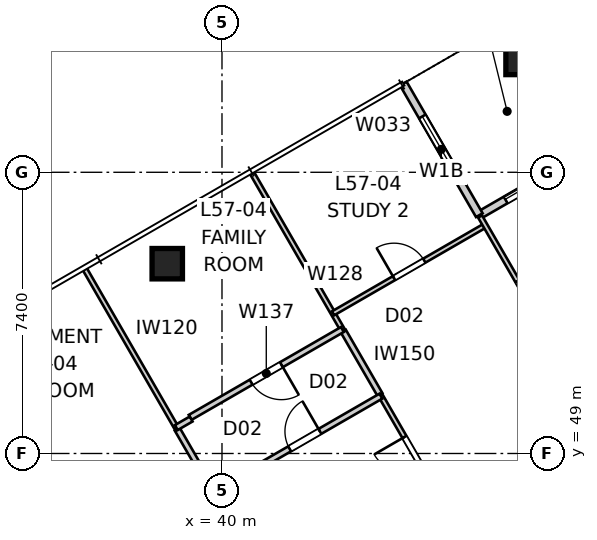
"""IFC4 building model, lengths in metres.
Left out: names, types, materials, properties, quantities, classifications, styles, units other than length and angle.
Written with IfcOpenShell. Run it as: python <this file> out.ifc"""

import sys

from ifc_helpers import new_model, si_unit, direction, frame, frame_2d, origin, origin_2d, place, context, subcontext, project, spatial, rectangle, extrude, element, fill, save


model = new_model("IFC4")
c1 = context("Model", 3, precision=1e-05, world=origin(), true_north=direction((0.0, 1.0)))
c2 = subcontext(c1, "Body", "Model", "MODEL_VIEW")
j1 = project(units=[si_unit("LENGTHUNIT", "METRE"), si_unit("PLANEANGLEUNIT", "RADIAN")], contexts=[c1])
p1 = place(None, origin())
s1 = spatial("IfcSite", under=j1, at=p1, CompositionType="ELEMENT")
p2 = place(p1, origin())
s2 = spatial("IfcBuilding", under=s1, at=p2, CompositionType="ELEMENT")
p3 = place(p2, frame((0.0, 0.0, 208.2)))
s3 = spatial("IfcBuildingStorey", under=s2, at=p3, CompositionType="ELEMENT", Elevation=208.2)
for number, where, z_axis, x_axis in (
    (1, (47.87, 59.37, -0.15), (0.0, 0.0, 1.0), (1.0, 0.0, 0.0)),
    (2, (38.56, 53.995, -0.15), (0.0, 0.0, 1.0), (1.0, 0.0, 0.0)),
):
    element("IfcColumn", number, at=place(p3, frame(where, z_axis=z_axis, x_axis=x_axis)), inside=s3, PredefinedType="COLUMN", context=c2, shape_type="SweptSolid", body=[
        extrude(rectangle(XDim=0.8, YDim=0.8, at=origin_2d()), origin(), (0.0, 0.0, 1.0), 3.55),
    ])
p4 = place(p3, frame((50.236, 57.271, 0.0), z_axis=(0.0, 0.0, 1.0), x_axis=(-0.866026010844, -0.49999894854, 0.0)))
e3 = element("IfcWall", 3, at=p4, inside=s3, PredefinedType="SOLIDWALL", context=c2, shape_type="SweptSolid", body=[
    extrude(rectangle(XDim=4.0, YDim=0.2, at=frame_2d((2.0, 0.0))), origin(), (0.0, 0.0, 1.0), 3.25),
])
p5 = place(p4, frame((0.8, 0.0, 0.0)))
e4 = element("IfcOpeningElement", 4, at=p5, cuts=e3, PredefinedType="OPENING", context=c2, shape_type="SweptSolid", body=[
    extrude(rectangle(XDim=2.4, YDim=2.1, at=frame_2d((1.2, 1.05))), frame((0.0, 0.11, 0.0), z_axis=(0.0, -1.0, 0.0), x_axis=(1.0, 0.0, 0.0)), (0.0, 0.0, 1.0), 0.22),
])
p6 = place(p3, frame((46.771, 55.271, 0.0), z_axis=(0.0, 0.0, 1.0), x_axis=(-0.49999894854, 0.866026010844, 0.0)))
e5 = element("IfcWall", 5, at=p6, inside=s3, PredefinedType="SOLIDWALL", context=c2, shape_type="SweptSolid", body=[
    extrude(rectangle(XDim=4.0, YDim=0.2, at=frame_2d((2.0, 0.0))), origin(), (0.0, 0.0, 1.0), 3.25),
])
p7 = place(p6, frame((1.0, 0.0, 0.45)))
e6 = element("IfcOpeningElement", 6, at=p7, cuts=e5, PredefinedType="OPENING", context=c2, shape_type="SweptSolid", body=[
    extrude(rectangle(XDim=2.0, YDim=1.8, at=frame_2d((1.0, 0.9))), frame((0.0, 0.11, 0.0), z_axis=(0.0, -1.0, 0.0), x_axis=(1.0, 0.0, 0.0)), (0.0, 0.0, 1.0), 0.22),
])
p8 = place(p3, frame((43.193, 52.219, 0.0), z_axis=(0.0, 0.0, 1.0), x_axis=(-0.50000634465, 0.866021740668, 0.0)))
e7 = element("IfcWall", 7, at=p8, inside=s3, PredefinedType="PARTITIONING", context=c2, shape_type="SweptSolid", body=[
    extrude(rectangle(XDim=4.814, YDim=0.12, at=frame_2d((2.407, 0.0))), origin(), (0.0, 0.0, 1.0), 3.25),
])
p9 = place(p3, frame((46.207, 47.0, 0.0), z_axis=(0.0, 0.0, 1.0), x_axis=(-0.499986975689, 0.866032923243, 0.0)))
e8 = element("IfcWall", 8, at=p9, inside=s3, PredefinedType="PARTITIONING", context=c2, shape_type="SweptSolid", body=[
    extrude(rectangle(XDim=4.101, YDim=0.12, at=frame_2d((2.051, 0.0))), origin(), (0.0, 0.0, 1.0), 3.25),
])
p10 = place(p9, frame((1.891, 0.0, 0.0)))
e9 = element("IfcOpeningElement", 9, at=p10, cuts=e8, PredefinedType="OPENING", context=c2, shape_type="SweptSolid", body=[
    extrude(rectangle(XDim=0.92, YDim=2.34, at=frame_2d((0.46, 1.17))), frame((0.0, 0.07, 0.0), z_axis=(0.0, -1.0, 0.0), x_axis=(1.0, 0.0, 0.0)), (0.0, 0.0, 1.0), 0.14),
])
p11 = place(p3, frame((42.922, 52.688, 0.0), z_axis=(0.0, 0.0, 1.0), x_axis=(0.866025598446, 0.499999662836, 0.0)))
e10 = element("IfcWall", 10, at=p11, inside=s3, PredefinedType="PARTITIONING", context=c2, shape_type="SweptSolid", body=[
    extrude(rectangle(XDim=4.625, YDim=0.12, at=frame_2d((2.312, 0.0))), origin(), (0.0, 0.0, 1.0), 3.25),
])
p12 = place(p11, frame((1.853, 0.0, 0.0)))
e11 = element("IfcOpeningElement", 11, at=p12, cuts=e10, PredefinedType="OPENING", context=c2, shape_type="SweptSolid", body=[
    extrude(rectangle(XDim=0.92, YDim=2.34, at=frame_2d((0.46, 1.17))), frame((0.0, 0.07, 0.0), z_axis=(0.0, -1.0, 0.0), x_axis=(1.0, 0.0, 0.0)), (0.0, 0.0, 1.0), 0.14),
])
p13 = place(p3, frame((46.792, 55.237, 0.0), z_axis=(0.0, 0.0, 1.0), x_axis=(0.500018023529, -0.866014997645, 0.0)))
e12 = element("IfcWall", 12, at=p13, inside=s3, PredefinedType="PARTITIONING", context=c2, shape_type="SweptSolid", body=[
    extrude(rectangle(XDim=4.576, YDim=0.12, at=frame_2d((2.288, 0.0))), origin(), (0.0, 0.0, 1.0), 3.25),
])
p14 = place(p13, frame((1.964, 0.0, 0.0)))
e13 = element("IfcOpeningElement", 13, at=p14, cuts=e12, PredefinedType="OPENING", context=c2, shape_type="SweptSolid", body=[
    extrude(rectangle(XDim=0.92, YDim=2.34, at=frame_2d((0.46, 1.17))), frame((0.0, 0.07, 0.0), z_axis=(0.0, -1.0, 0.0), x_axis=(1.0, 0.0, 0.0)), (0.0, 0.0, 1.0), 0.14),
])
p15 = place(p3, frame((44.156, 50.552, 0.0), z_axis=(0.0, 0.0, 1.0), x_axis=(-0.50001143954, 0.866018799062, 0.0)))
e14 = element("IfcWall", 14, at=p15, inside=s3, PredefinedType="SOLIDWALL", context=c2, shape_type="SweptSolid", body=[
    extrude(rectangle(XDim=1.926, YDim=0.15, at=frame_2d((0.963, 0.0))), origin(), (0.0, 0.0, 1.0), 3.25),
])
p16 = place(p3, frame((35.525, 47.0, 0.0), z_axis=(0.0, 0.0, 1.0), x_axis=(-0.49997732567, 0.866038494419, 0.0)))
e15 = element("IfcWall", 15, at=p16, inside=s3, PredefinedType="PARTITIONING", context=c2, shape_type="SweptSolid", body=[
    extrude(rectangle(XDim=5.5, YDim=0.12, at=frame_2d((2.75, 0.0))), origin(), (0.0, 0.0, 1.0), 3.25),
])
p17 = place(p16, frame((2.31, 0.0, 0.0)))
e16 = element("IfcOpeningElement", 16, at=p17, cuts=e15, PredefinedType="OPENING", context=c2, shape_type="SweptSolid", body=[
    extrude(rectangle(XDim=0.92, YDim=2.34, at=frame_2d((0.46, 1.17))), frame((0.0, 0.07, 0.0), z_axis=(0.0, -1.0, 0.0), x_axis=(1.0, 0.0, 0.0)), (0.0, 0.0, 1.0), 0.14),
])
p18 = place(p3, frame((36.391, 53.851, 0.0), z_axis=(0.0, 0.0, 1.0), x_axis=(0.500036734544, -0.866004194047, 0.0)))
e17 = element("IfcWall", 17, at=p18, inside=s3, PredefinedType="PARTITIONING", context=c2, shape_type="SweptSolid", body=[
    extrude(rectangle(XDim=4.864, YDim=0.12, at=frame_2d((2.432, 0.0))), origin(), (0.0, 0.0, 1.0), 3.25),
])
p19 = place(p3, frame((38.823, 49.639, 0.0), z_axis=(0.0, 0.0, 1.0), x_axis=(0.499999897272, -0.866025463095, 0.0)))
e18 = element("IfcWall", 18, at=p19, inside=s3, PredefinedType="SOLIDWALL", context=c2, shape_type="SweptSolid", body=[
    extrude(rectangle(XDim=3.047, YDim=0.15, at=frame_2d((1.523, 0.0))), origin(), (0.0, 0.0, 1.0), 3.25),
])
p20 = place(p3, frame((43.168, 52.263, 0.0), z_axis=(0.0, 0.0, 1.0), x_axis=(-0.866025598446, -0.499999662836, 0.0)))
e19 = element("IfcWall", 19, at=p20, inside=s3, PredefinedType="SOLIDWALL", context=c2, shape_type="SweptSolid", body=[
    extrude(rectangle(XDim=4.625, YDim=0.15, at=frame_2d((2.312, 0.0))), origin(), (0.0, 0.0, 1.0), 3.25),
])
p21 = place(p20, frame((1.853, 0.0, 0.0)))
e20 = element("IfcOpeningElement", 20, at=p21, cuts=e19, PredefinedType="OPENING", context=c2, shape_type="SweptSolid", body=[
    extrude(rectangle(XDim=0.92, YDim=2.34, at=frame_2d((0.46, 1.17))), frame((0.0, 0.085, 0.0), z_axis=(0.0, -1.0, 0.0), x_axis=(1.0, 0.0, 0.0)), (0.0, 0.0, 1.0), 0.17),
])
p22 = place(p3, frame((39.188, 49.907, 0.0), z_axis=(0.0, 0.0, 1.0), x_axis=(-0.865896406789, -0.500223362819, 0.0)))
e21 = element("IfcWall", 21, at=p22, inside=s3, PredefinedType="SOLIDWALL", context=c2, shape_type="SweptSolid", body=[
    extrude(rectangle(XDim=0.45, YDim=0.15, at=frame_2d((0.225, 0.0))), origin(), (0.0, 0.0, 1.0), 3.25),
])
p23 = place(p3, frame((40.176, 48.196, 0.0), z_axis=(0.0, 0.0, 1.0), x_axis=(0.866025598446, 0.499999662836, 0.0)))
e22 = element("IfcWall", 22, at=p23, inside=s3, PredefinedType="SOLIDWALL", context=c2, shape_type="SweptSolid", body=[
    extrude(rectangle(XDim=4.625, YDim=0.15, at=frame_2d((2.312, 0.0))), origin(), (0.0, 0.0, 1.0), 3.25),
])
p24 = place(p23, frame((1.853, 0.0, 0.0)))
e23 = element("IfcOpeningElement", 23, at=p24, cuts=e22, PredefinedType="OPENING", context=c2, shape_type="SweptSolid", body=[
    extrude(rectangle(XDim=0.92, YDim=2.34, at=frame_2d((0.46, 1.17))), frame((0.0, 0.085, 0.0), z_axis=(0.0, -1.0, 0.0), x_axis=(1.0, 0.0, 0.0)), (0.0, 0.0, 1.0), 0.17),
])
p25 = place(p5, origin())
e24 = element("IfcDoor", 24, at=p25, inside=s3, OperationType="SLIDING_TO_LEFT", PredefinedType="DOOR", context=c2, shape_type="SweptSolid", body=[
    extrude(rectangle(XDim=2.4, YDim=2.1, at=frame_2d((1.2, 1.05))), frame((0.0, 0.025, 0.0), z_axis=(0.0, -1.0, 0.0), x_axis=(1.0, 0.0, 0.0)), (0.0, 0.0, 1.0), 0.05),
])
fill(e4, e24)
p26 = place(p7, origin())
e25 = element("IfcWindow", 25, at=p26, inside=s3, PartitioningType="SINGLE_PANEL", PredefinedType="WINDOW", context=c2, shape_type="SweptSolid", body=[
    extrude(rectangle(XDim=2.0, YDim=1.8, at=frame_2d((1.0, 0.9))), frame((0.0, 0.03, 0.0), z_axis=(0.0, -1.0, 0.0), x_axis=(1.0, 0.0, 0.0)), (0.0, 0.0, 1.0), 0.06),
])
fill(e6, e25)
p27 = place(p24, origin())
e26 = element("IfcDoor", 26, at=p27, inside=s3, OperationType="SINGLE_SWING_RIGHT", PredefinedType="DOOR", context=c2, shape_type="SweptSolid", body=[
    extrude(rectangle(XDim=0.92, YDim=2.34, at=frame_2d((0.46, 1.17))), frame((0.0, 0.025, 0.0), z_axis=(0.0, -1.0, 0.0), x_axis=(1.0, 0.0, 0.0)), (0.0, 0.0, 1.0), 0.05),
])
fill(e23, e26)
p28 = place(p10, origin())
e27 = element("IfcDoor", 27, at=p28, inside=s3, OperationType="SINGLE_SWING_RIGHT", PredefinedType="DOOR", context=c2, shape_type="SweptSolid", body=[
    extrude(rectangle(XDim=0.92, YDim=2.34, at=frame_2d((0.46, 1.17))), frame((0.0, 0.025, 0.0), z_axis=(0.0, -1.0, 0.0), x_axis=(1.0, 0.0, 0.0)), (0.0, 0.0, 1.0), 0.05),
])
fill(e9, e27)
p29 = place(p21, origin())
e28 = element("IfcDoor", 28, at=p29, inside=s3, OperationType="SINGLE_SWING_LEFT", PredefinedType="DOOR", context=c2, shape_type="SweptSolid", body=[
    extrude(rectangle(XDim=0.92, YDim=2.34, at=frame_2d((0.46, 1.17))), frame((0.0, 0.025, 0.0), z_axis=(0.0, -1.0, 0.0), x_axis=(1.0, 0.0, 0.0)), (0.0, 0.0, 1.0), 0.05),
])
fill(e20, e28)
p30 = place(p12, origin())
e29 = element("IfcDoor", 29, at=p30, inside=s3, OperationType="SINGLE_SWING_LEFT", PredefinedType="DOOR", context=c2, shape_type="SweptSolid", body=[
    extrude(rectangle(XDim=0.92, YDim=2.34, at=frame_2d((0.46, 1.17))), frame((0.0, 0.025, 0.0), z_axis=(0.0, -1.0, 0.0), x_axis=(1.0, 0.0, 0.0)), (0.0, 0.0, 1.0), 0.05),
])
fill(e11, e29)
p31 = place(p14, origin())
e30 = element("IfcDoor", 30, at=p31, inside=s3, OperationType="SINGLE_SWING_RIGHT", PredefinedType="DOOR", context=c2, shape_type="SweptSolid", body=[
    extrude(rectangle(XDim=0.92, YDim=2.34, at=frame_2d((0.46, 1.17))), frame((0.0, 0.025, 0.0), z_axis=(0.0, -1.0, 0.0), x_axis=(1.0, 0.0, 0.0)), (0.0, 0.0, 1.0), 0.05),
])
fill(e13, e30)
save(model, sys.argv[1])
